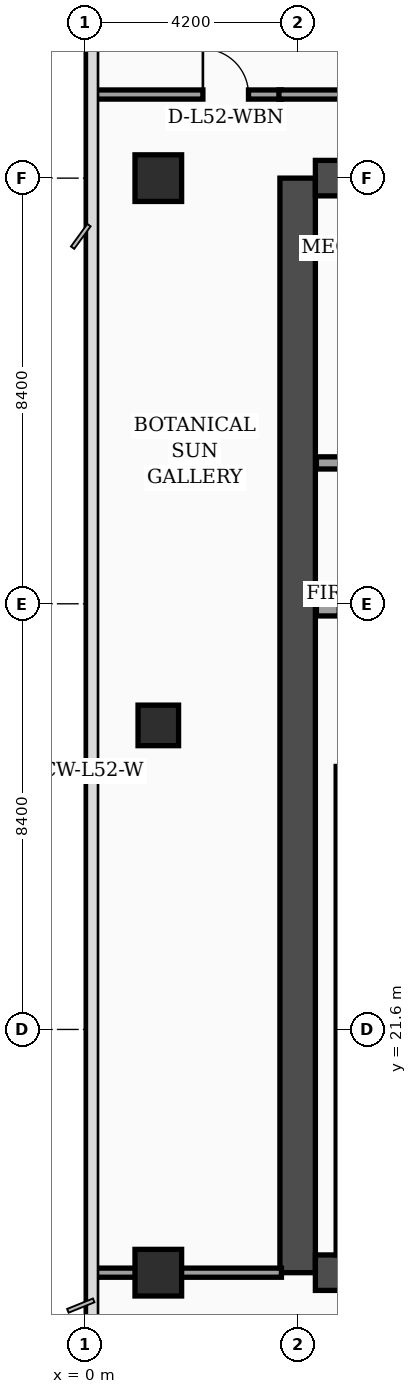
"""IFC4 building model, lengths in metres.
Left out: names, types, materials, properties, quantities, classifications, styles, units other than length and angle.
Written with IfcOpenShell. Run it as: python <this file> out.ifc"""

import sys

from ifc_helpers import new_model, si_unit, direction, frame, frame_2d, origin, origin_2d, place, context, subcontext, project, spatial, rectangle, extrude, element, fill, save


model = new_model("IFC4")
c1 = context("Model", 3, precision=1e-05, world=origin(), true_north=direction((0.0, 1.0)))
c2 = subcontext(c1, "Body", "Model", "MODEL_VIEW")
j1 = project(units=[si_unit("LENGTHUNIT", "METRE"), si_unit("PLANEANGLEUNIT", "RADIAN")], contexts=[c1])
p1 = place(None, origin())
s1 = spatial("IfcSite", under=j1, at=p1, CompositionType="ELEMENT")
p2 = place(p1, origin())
s2 = spatial("IfcBuilding", under=s1, at=p2, CompositionType="ELEMENT")
p3 = place(p2, frame((0.0, 0.0, 211.0)))
s3 = spatial("IfcBuildingStorey", under=s2, at=p3, CompositionType="ELEMENT", Elevation=211.0)
p4 = place(p3, frame((4.2, 16.8, 0.0), z_axis=(0.0, 0.0, 1.0), x_axis=(0.0, 1.0, 0.0)))
e1 = element("IfcWall", 1, at=p4, inside=s3, PredefinedType="SHEAR", context=c2, shape_type="SweptSolid", body=[
    extrude(rectangle(XDim=21.6, YDim=0.7, at=frame_2d((10.8, 0.0))), origin(), (0.0, 0.0, 1.0), 3.56),
])
for number, where, z_axis, x_axis in (
    (2, (4.55, 38.4, 0.0), (0.0, 0.0, 1.0), (1.0, 0.0, 0.0)),
    (3, (4.55, 16.8, 0.0), (0.0, 0.0, 1.0), (1.0, 0.0, 0.0)),
):
    element("IfcWall", number, at=place(p3, frame(where, z_axis=z_axis, x_axis=x_axis)), inside=s3, PredefinedType="SHEAR", context=c2, shape_type="SweptSolid", body=[
        extrude(rectangle(XDim=10.1, YDim=0.7, at=frame_2d((5.05, 0.0))), origin(), (0.0, 0.0, 1.0), 3.56),
    ])
p5 = place(p3, frame((5.08, 17.15, 0.0), z_axis=(0.0, 0.0, 1.0), x_axis=(0.0, 1.0, 0.0)))
e4 = element("IfcWall", 4, at=p5, inside=s3, PredefinedType="SOLIDWALL", context=c2, shape_type="SweptSolid", body=[
    extrude(rectangle(XDim=9.64, YDim=0.24, at=frame_2d((4.82, 0.0))), origin(), (0.0, 0.0, 1.0), 3.56),
])
p6 = place(p3, frame((1.45, 16.8, 0.0), z_axis=(0.0, 0.0, 1.0), x_axis=(1.0, 0.0, 0.0)))
e5 = element("IfcColumn", 5, at=p6, inside=s3, PredefinedType="COLUMN", context=c2, shape_type="SweptSolid", body=[
    extrude(rectangle(XDim=0.92, YDim=0.92, at=origin_2d()), origin(), (0.0, 0.0, 1.0), 3.56),
])
p7 = place(p3, frame((1.45, 27.6, 0.0), z_axis=(0.0, 0.0, 1.0), x_axis=(1.0, 0.0, 0.0)))
e6 = element("IfcColumn", 6, at=p7, inside=s3, PredefinedType="COLUMN", context=c2, shape_type="SweptSolid", body=[
    extrude(rectangle(XDim=0.8, YDim=0.8, at=origin_2d()), origin(), (0.0, 0.0, 1.0), 3.56),
])
p8 = place(p3, frame((1.45, 38.4, 0.0), z_axis=(0.0, 0.0, 1.0), x_axis=(1.0, 0.0, 0.0)))
e7 = element("IfcColumn", 7, at=p8, inside=s3, PredefinedType="COLUMN", context=c2, shape_type="SweptSolid", body=[
    extrude(rectangle(XDim=0.92, YDim=0.92, at=origin_2d()), origin(), (0.0, 0.0, 1.0), 3.56),
])
p9 = place(p3, frame((4.57, 29.88, 0.0), z_axis=(0.0, 0.0, 1.0), x_axis=(1.0, 0.0, 0.0)))
e8 = element("IfcWall", 8, at=p9, inside=s3, PredefinedType="SOLIDWALL", context=c2, shape_type="SweptSolid", body=[
    extrude(rectangle(XDim=4.85, YDim=0.24, at=frame_2d((2.425, 0.0))), origin(), (0.0, 0.0, 1.0), 3.56),
])
p10 = place(p9, frame((0.45, 0.0, 0.0)))
e9 = element("IfcOpeningElement", 9, at=p10, cuts=e8, PredefinedType="OPENING", context=c2, shape_type="SweptSolid", body=[
    extrude(rectangle(XDim=1.3, YDim=2.35, at=frame_2d((0.65, 1.175))), frame((0.0, 0.13, 0.0), z_axis=(0.0, -1.0, 0.0), x_axis=(1.0, 0.0, 0.0)), (0.0, 0.0, 1.0), 0.26),
])
p11 = place(p3, frame((4.57, 32.78, 0.0), z_axis=(0.0, 0.0, 1.0), x_axis=(1.0, 0.0, 0.0)))
e10 = element("IfcWall", 10, at=p11, inside=s3, PredefinedType="SOLIDWALL", context=c2, shape_type="SweptSolid", body=[
    extrude(rectangle(XDim=4.85, YDim=0.24, at=frame_2d((2.425, 0.0))), origin(), (0.0, 0.0, 1.0), 3.19),
])
p12 = place(p3, frame((0.08, 16.8, 0.0), z_axis=(0.0, 0.0, 1.0), x_axis=(1.0, 0.0, 0.0)))
e11 = element("IfcWall", 11, at=p12, inside=s3, PredefinedType="PARTITIONING", context=c2, shape_type="SweptSolid", body=[
    extrude(rectangle(XDim=3.8, YDim=0.18, at=frame_2d((1.9, 0.0))), origin(), (0.0, 0.0, 1.0), 2.94),
])
p13 = place(p3, frame((0.08, 40.05, 0.0), z_axis=(0.0, 0.0, 1.0), x_axis=(1.0, 0.0, 0.0)))
e12 = element("IfcWall", 12, at=p13, inside=s3, PredefinedType="PARTITIONING", context=c2, shape_type="SweptSolid", body=[
    extrude(rectangle(XDim=3.8, YDim=0.18, at=frame_2d((1.9, 0.0))), origin(), (0.0, 0.0, 1.0), 2.94),
])
p14 = place(p13, frame((2.25, 0.0, 0.0)))
e13 = element("IfcOpeningElement", 13, at=p14, cuts=e12, PredefinedType="OPENING", context=c2, shape_type="SweptSolid", body=[
    extrude(rectangle(XDim=0.9, YDim=2.15, at=frame_2d((0.45, 1.075))), frame((0.0, 0.1, 0.0), z_axis=(0.0, -1.0, 0.0), x_axis=(1.0, 0.0, 0.0)), (0.0, 0.0, 1.0), 0.2),
])
p15 = place(p3, frame((3.83, 40.05, 0.0), z_axis=(0.0, 0.0, 1.0), x_axis=(1.0, 0.0, 0.0)))
e14 = element("IfcWall", 14, at=p15, inside=s3, PredefinedType="PARTITIONING", context=c2, shape_type="SweptSolid", body=[
    extrude(rectangle(XDim=11.32, YDim=0.18, at=frame_2d((5.66, 0.0))), origin(), (0.0, 0.0, 1.0), 2.94),
])
p16 = place(p14, origin())
e15 = element("IfcDoor", 15, at=p16, inside=s3, OperationType="SINGLE_SWING_LEFT", PredefinedType="DOOR", context=c2, shape_type="SweptSolid", body=[
    extrude(rectangle(XDim=0.9, YDim=2.15, at=frame_2d((0.45, 1.075))), frame((0.0, 0.025, 0.0), z_axis=(0.0, -1.0, 0.0), x_axis=(1.0, 0.0, 0.0)), (0.0, 0.0, 1.0), 0.05),
])
fill(e13, e15)
save(model, sys.argv[1])
